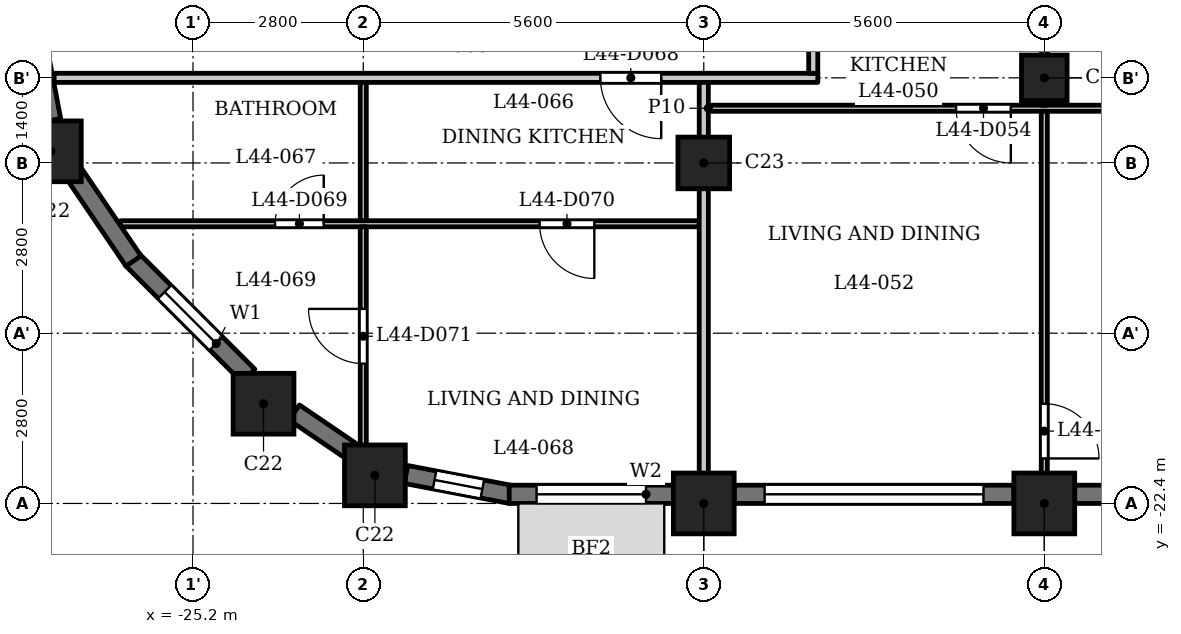
"""IFC4 building model, lengths in metres.
Left out: names, types, materials, properties, quantities, classifications, styles, units other than length and angle.
Written with IfcOpenShell. Run it as: python <this file> out.ifc"""

import sys

from ifc_helpers import new_model, si_unit, direction, frame, frame_2d, origin, origin_2d, place, context, subcontext, project, spatial, rectangle, extrude, element, fill, save


model = new_model("IFC4")
c1 = context("Model", 3, precision=1e-05, world=origin(), true_north=direction((0.0, 1.0)))
c2 = subcontext(c1, "Body", "Model", "MODEL_VIEW")
j1 = project(units=[si_unit("LENGTHUNIT", "METRE"), si_unit("PLANEANGLEUNIT", "RADIAN")], contexts=[c1])
p1 = place(None, origin())
s1 = spatial("IfcSite", under=j1, at=p1, CompositionType="ELEMENT")
p2 = place(p1, origin())
s2 = spatial("IfcBuilding", under=s1, at=p2, CompositionType="ELEMENT")
p3 = place(p2, frame((0.0, 0.0, 171.1)))
s3 = spatial("IfcBuildingStorey", under=s2, at=p3, CompositionType="ELEMENT", Elevation=171.1)
for number, where, z_axis, x_axis in (
    (1, (-22.209, -21.938, 0.0), (0.0, 0.0, 1.0), (1.0, 0.0, 0.0)),
    (2, (-16.8, -22.4, 0.0), (0.0, 0.0, 1.0), (1.0, 0.0, 0.0)),
    (3, (-11.2, -22.4, 0.0), (0.0, 0.0, 1.0), (1.0, 0.0, 0.0)),
    (4, (-27.538, -16.609, 0.0), (0.0, 0.0, 1.0), (1.0, 0.0, 0.0)),
    (5, (-24.04, -20.76, 0.0), (0.0, 0.0, 1.0), (1.0, 0.0, 0.0)),
):
    element("IfcColumn", number, at=place(p3, frame(where, z_axis=z_axis, x_axis=x_axis)), inside=s3, PredefinedType="COLUMN", context=c2, shape_type="SweptSolid", body=[
        extrude(rectangle(XDim=1.0, YDim=1.0, at=origin_2d()), origin(), (0.0, 0.0, 1.0), 3.5),
    ])
p4 = place(p3, frame((-16.8, -16.8, 0.0), z_axis=(0.0, 0.0, 1.0), x_axis=(1.0, 0.0, 0.0)))
e6 = element("IfcColumn", 6, at=p4, inside=s3, PredefinedType="COLUMN", context=c2, shape_type="SweptSolid", body=[
    extrude(rectangle(XDim=0.85, YDim=0.85, at=origin_2d()), origin(), (0.0, 0.0, 1.0), 3.5),
])
p5 = place(p3, frame((-11.2, -15.4, 0.0), z_axis=(0.0, 0.0, 1.0), x_axis=(1.0, 0.0, 0.0)))
e7 = element("IfcColumn", 7, at=p5, inside=s3, PredefinedType="COLUMN", context=c2, shape_type="SweptSolid", body=[
    extrude(rectangle(XDim=0.75, YDim=0.75, at=origin_2d()), origin(), (0.0, 0.0, 1.0), 3.5),
])
p6 = place(p3, frame((-26.197, -18.391, 0.0), z_axis=(0.0, 0.0, 1.0), x_axis=(0.707061571201, -0.707151988282, 0.0)))
e8 = element("IfcWall", 8, at=p6, inside=s3, PredefinedType="SOLIDWALL", context=c2, shape_type="SweptSolid", body=[
    extrude(rectangle(XDim=2.7, YDim=0.3, at=frame_2d((1.35, 0.0))), origin(), (0.0, 0.0, 1.0), 2.45),
])
p7 = place(p6, frame((0.75, 0.0, 0.6)))
e9 = element("IfcOpeningElement", 9, at=p7, cuts=e8, PredefinedType="OPENING", context=c2, shape_type="SweptSolid", body=[
    extrude(rectangle(XDim=1.2, YDim=1.55, at=frame_2d((0.6, 0.775))), frame((0.0, 0.16, 0.0), z_axis=(0.0, -1.0, 0.0), x_axis=(1.0, 0.0, 0.0)), (0.0, 0.0, 1.0), 0.32),
])
p8 = place(p3, frame((-23.534, -20.904, 0.0), z_axis=(0.0, 0.0, 1.0), x_axis=(0.827103906596, -0.56204904385, 0.0)))
e10 = element("IfcWall", 10, at=p8, inside=s3, PredefinedType="SOLIDWALL", context=c2, shape_type="SweptSolid", body=[
    extrude(rectangle(XDim=1.177, YDim=0.3, at=frame_2d((0.589, 0.0))), origin(), (0.0, 0.0, 1.0), 3.2),
])
p9 = place(p3, frame((-21.697, -21.924, 0.0), z_axis=(0.0, 0.0, 1.0), x_axis=(0.982284988433, -0.187393173565, 0.0)))
e11 = element("IfcWall", 11, at=p9, inside=s3, PredefinedType="SOLIDWALL", context=c2, shape_type="SweptSolid", body=[
    extrude(rectangle(XDim=1.756, YDim=0.3, at=frame_2d((0.878, 0.0))), origin(), (0.0, 0.0, 1.0), 2.45),
])
p10 = place(p9, frame((0.478, 0.0, 0.6)))
e12 = element("IfcOpeningElement", 12, at=p10, cuts=e11, PredefinedType="OPENING", context=c2, shape_type="SweptSolid", body=[
    extrude(rectangle(XDim=0.8, YDim=1.55, at=frame_2d((0.4, 0.775))), frame((0.0, 0.16, 0.0), z_axis=(0.0, -1.0, 0.0), x_axis=(1.0, 0.0, 0.0)), (0.0, 0.0, 1.0), 0.32),
])
p11 = place(p3, frame((-20.0, -22.25, 0.0), z_axis=(0.0, 0.0, 1.0), x_axis=(1.0, 0.0, 0.0)))
e13 = element("IfcWall", 13, at=p11, inside=s3, PredefinedType="SOLIDWALL", context=c2, shape_type="SweptSolid", body=[
    extrude(rectangle(XDim=2.7, YDim=0.3, at=frame_2d((1.35, 0.0))), origin(), (0.0, 0.0, 1.0), 2.45),
])
p12 = place(p11, frame((0.45, 0.0, 0.9)))
e14 = element("IfcOpeningElement", 14, at=p12, cuts=e13, PredefinedType="OPENING", context=c2, shape_type="SweptSolid", body=[
    extrude(rectangle(XDim=1.8, YDim=1.25, at=frame_2d((0.9, 0.625))), frame((0.0, 0.16, 0.0), z_axis=(0.0, -1.0, 0.0), x_axis=(1.0, 0.0, 0.0)), (0.0, 0.0, 1.0), 0.32),
])
p13 = place(p3, frame((-16.3, -22.25, 0.0), z_axis=(0.0, 0.0, 1.0), x_axis=(1.0, 0.0, 0.0)))
e15 = element("IfcWall", 15, at=p13, inside=s3, PredefinedType="SOLIDWALL", context=c2, shape_type="SweptSolid", body=[
    extrude(rectangle(XDim=4.6, YDim=0.3, at=frame_2d((2.3, 0.0))), origin(), (0.0, 0.0, 1.0), 2.45),
])
p14 = place(p13, frame((0.5, 0.0, 1.2)))
e16 = element("IfcOpeningElement", 16, at=p14, cuts=e15, PredefinedType="OPENING", context=c2, shape_type="SweptSolid", body=[
    extrude(rectangle(XDim=3.6, YDim=0.95, at=frame_2d((1.8, 0.475))), frame((0.0, 0.16, 0.0), z_axis=(0.0, -1.0, 0.0), x_axis=(1.0, 0.0, 0.0)), (0.0, 0.0, 1.0), 0.32),
])
p15 = place(p3, frame((-10.7, -22.25, 0.0), z_axis=(0.0, 0.0, 1.0), x_axis=(1.0, 0.0, 0.0)))
e17 = element("IfcWall", 17, at=p15, inside=s3, PredefinedType="SOLIDWALL", context=c2, shape_type="SweptSolid", body=[
    extrude(rectangle(XDim=4.6, YDim=0.3, at=frame_2d((2.3, 0.0))), origin(), (0.0, 0.0, 1.0), 2.45),
])
p16 = place(p15, frame((0.5, 0.0, 1.2)))
e18 = element("IfcOpeningElement", 18, at=p16, cuts=e17, PredefinedType="OPENING", context=c2, shape_type="SweptSolid", body=[
    extrude(rectangle(XDim=3.6, YDim=0.95, at=frame_2d((1.8, 0.475))), frame((0.0, 0.16, 0.0), z_axis=(0.0, -1.0, 0.0), x_axis=(1.0, 0.0, 0.0)), (0.0, 0.0, 1.0), 0.32),
])
for number, where, z_axis, x_axis in (
    (19, (-27.853, -14.372, 0.0), (0.0, 0.0, 1.0), (0.187, -0.982, 0.0)),
    (20, (-27.166, -16.96, 0.0), (0.0, 0.0, 1.0), (0.562, -0.827, 0.0)),
):
    element("IfcWall", number, at=place(p3, frame(where, z_axis=z_axis, x_axis=x_axis)), inside=s3, PredefinedType="SOLIDWALL", context=c2, shape_type="SweptSolid", body=[
        extrude(rectangle(XDim=1.756, YDim=0.3, at=frame_2d((0.878, 0.0))), origin(), (0.0, 0.0, 1.0), 2.45),
    ])
p17 = place(p3, frame((-26.394, -17.8, 0.0), z_axis=(0.0, 0.0, 1.0), x_axis=(1.0, 0.0, 0.0)))
e21 = element("IfcWall", 21, at=p17, inside=s3, PredefinedType="PARTITIONING", context=c2, shape_type="SweptSolid", body=[
    extrude(rectangle(XDim=9.519, YDim=0.1, at=frame_2d((4.76, 0.0))), origin(), (0.0, 0.0, 1.0), 3.2),
])
p18 = place(p17, frame((2.544, 0.0, 0.0)))
e22 = element("IfcOpeningElement", 22, at=p18, cuts=e21, PredefinedType="OPENING", context=c2, shape_type="SweptSolid", body=[
    extrude(rectangle(XDim=0.8, YDim=2.1, at=frame_2d((0.4, 1.05))), frame((0.0, 0.06, 0.0), z_axis=(0.0, -1.0, 0.0), x_axis=(1.0, 0.0, 0.0)), (0.0, 0.0, 1.0), 0.12),
])
p19 = place(p17, frame((6.894, 0.0, 0.0)))
e23 = element("IfcOpeningElement", 23, at=p19, cuts=e21, PredefinedType="OPENING", context=c2, shape_type="SweptSolid", body=[
    extrude(rectangle(XDim=0.9, YDim=2.1, at=frame_2d((0.45, 1.05))), frame((0.0, 0.06, 0.0), z_axis=(0.0, -1.0, 0.0), x_axis=(1.0, 0.0, 0.0)), (0.0, 0.0, 1.0), 0.12),
])
p20 = place(p3, frame((-16.725, -15.9, 0.0), z_axis=(0.0, 0.0, 1.0), x_axis=(1.0, 0.0, 0.0)))
e24 = element("IfcWall", 24, at=p20, inside=s3, PredefinedType="PARTITIONING", context=c2, shape_type="SweptSolid", body=[
    extrude(rectangle(XDim=33.45, YDim=0.1, at=frame_2d((16.725, 0.0))), origin(), (0.0, 0.0, 1.0), 3.2),
])
p21 = place(p20, frame((9.675, 0.0, 0.0)))
e25 = element("IfcOpeningElement", 25, at=p21, cuts=e24, PredefinedType="OPENING", context=c2, shape_type="SweptSolid", body=[
    extrude(rectangle(XDim=0.8, YDim=2.1, at=frame_2d((0.4, 1.05))), frame((0.0, 0.06, 0.0), z_axis=(0.0, -1.0, 0.0), x_axis=(1.0, 0.0, 0.0)), (0.0, 0.0, 1.0), 0.12),
])
p22 = place(p20, frame((4.075, 0.0, 0.0)))
e26 = element("IfcOpeningElement", 26, at=p22, cuts=e24, PredefinedType="OPENING", context=c2, shape_type="SweptSolid", body=[
    extrude(rectangle(XDim=0.9, YDim=2.1, at=frame_2d((0.45, 1.05))), frame((0.0, 0.06, 0.0), z_axis=(0.0, -1.0, 0.0), x_axis=(1.0, 0.0, 0.0)), (0.0, 0.0, 1.0), 0.12),
])
p23 = place(p20, frame((20.875, 0.0, 0.0)))
e27 = element("IfcOpeningElement", 27, at=p23, cuts=e24, PredefinedType="OPENING", context=c2, shape_type="SweptSolid", body=[
    extrude(rectangle(XDim=0.8, YDim=2.1, at=frame_2d((0.4, 1.05))), frame((0.0, 0.06, 0.0), z_axis=(0.0, -1.0, 0.0), x_axis=(1.0, 0.0, 0.0)), (0.0, 0.0, 1.0), 0.12),
])
p24 = place(p20, frame((15.275, 0.0, 0.0)))
e28 = element("IfcOpeningElement", 28, at=p24, cuts=e24, PredefinedType="OPENING", context=c2, shape_type="SweptSolid", body=[
    extrude(rectangle(XDim=0.9, YDim=2.1, at=frame_2d((0.45, 1.05))), frame((0.0, 0.06, 0.0), z_axis=(0.0, -1.0, 0.0), x_axis=(1.0, 0.0, 0.0)), (0.0, 0.0, 1.0), 0.12),
])
p25 = place(p20, frame((30.825, 0.0, 0.0)))
e29 = element("IfcOpeningElement", 29, at=p25, cuts=e24, PredefinedType="OPENING", context=c2, shape_type="SweptSolid", body=[
    extrude(rectangle(XDim=0.8, YDim=2.1, at=frame_2d((0.4, 1.05))), frame((0.0, 0.06, 0.0), z_axis=(0.0, -1.0, 0.0), x_axis=(1.0, 0.0, 0.0)), (0.0, 0.0, 1.0), 0.12),
])
p26 = place(p20, frame((26.475, 0.0, 0.0)))
e30 = element("IfcOpeningElement", 30, at=p26, cuts=e24, PredefinedType="OPENING", context=c2, shape_type="SweptSolid", body=[
    extrude(rectangle(XDim=0.9, YDim=2.1, at=frame_2d((0.45, 1.05))), frame((0.0, 0.06, 0.0), z_axis=(0.0, -1.0, 0.0), x_axis=(1.0, 0.0, 0.0)), (0.0, 0.0, 1.0), 0.12),
])
p27 = place(p3, frame((-27.484, -15.4, 0.0), z_axis=(0.0, 0.0, 1.0), x_axis=(1.0, 0.0, 0.0)))
e31 = element("IfcWall", 31, at=p27, inside=s3, PredefinedType="PARTITIONING", context=c2, shape_type="SweptSolid", body=[
    extrude(rectangle(XDim=12.559, YDim=0.15, at=frame_2d((6.279, 0.0))), origin(), (0.0, 0.0, 1.0), 3.2),
])
p28 = place(p27, frame((8.984, 0.0, 0.0)))
e32 = element("IfcOpeningElement", 32, at=p28, cuts=e31, PredefinedType="OPENING", context=c2, shape_type="SweptSolid", body=[
    extrude(rectangle(XDim=1.0, YDim=2.1, at=frame_2d((0.5, 1.05))), frame((0.0, 0.085, 0.0), z_axis=(0.0, -1.0, 0.0), x_axis=(1.0, 0.0, 0.0)), (0.0, 0.0, 1.0), 0.17),
])
p29 = place(p3, frame((-22.4, -21.72, 0.0), z_axis=(0.0, 0.0, 1.0), x_axis=(0.0, 1.0, 0.0)))
e33 = element("IfcWall", 33, at=p29, inside=s3, PredefinedType="PARTITIONING", context=c2, shape_type="SweptSolid", body=[
    extrude(rectangle(XDim=3.87, YDim=0.1, at=frame_2d((1.935, 0.0))), origin(), (0.0, 0.0, 1.0), 3.2),
])
p30 = place(p29, frame((1.62, 0.0, 0.0)))
e34 = element("IfcOpeningElement", 34, at=p30, cuts=e33, PredefinedType="OPENING", context=c2, shape_type="SweptSolid", body=[
    extrude(rectangle(XDim=0.9, YDim=2.1, at=frame_2d((0.45, 1.05))), frame((0.0, 0.06, 0.0), z_axis=(0.0, -1.0, 0.0), x_axis=(1.0, 0.0, 0.0)), (0.0, 0.0, 1.0), 0.12),
])
p31 = place(p3, frame((-22.4, -17.75, 0.0), z_axis=(0.0, 0.0, 1.0), x_axis=(0.0, 1.0, 0.0)))
e35 = element("IfcWall", 35, at=p31, inside=s3, PredefinedType="PARTITIONING", context=c2, shape_type="SweptSolid", body=[
    extrude(rectangle(XDim=2.275, YDim=0.1, at=frame_2d((1.137, 0.0))), origin(), (0.0, 0.0, 1.0), 3.2),
])
p32 = place(p3, frame((-16.8, -22.88, 0.0), z_axis=(0.0, 0.0, 1.0), x_axis=(0.0, 1.0, 0.0)))
e36 = element("IfcWall", 36, at=p32, inside=s3, PredefinedType="PARTITIONING", context=c2, shape_type="SweptSolid", body=[
    extrude(rectangle(XDim=7.405, YDim=0.15, at=frame_2d((3.702, 0.0))), origin(), (0.0, 0.0, 1.0), 3.2),
])
p33 = place(p3, frame((-15.0, -15.325, 0.0), z_axis=(0.0, 0.0, 1.0), x_axis=(0.0, 1.0, 0.0)))
e37 = element("IfcWall", 37, at=p33, inside=s3, PredefinedType="PARTITIONING", context=c2, shape_type="SweptSolid", body=[
    extrude(rectangle(XDim=2.05, YDim=0.15, at=frame_2d((1.025, 0.0))), origin(), (0.0, 0.0, 1.0), 3.2),
])
p34 = place(p33, frame((0.574, 0.0, 0.0)))
e38 = element("IfcOpeningElement", 38, at=p34, cuts=e37, PredefinedType="OPENING", context=c2, shape_type="SweptSolid", body=[
    extrude(rectangle(XDim=1.0, YDim=2.1, at=frame_2d((0.5, 1.05))), frame((0.0, 0.085, 0.0), z_axis=(0.0, -1.0, 0.0), x_axis=(1.0, 0.0, 0.0)), (0.0, 0.0, 1.0), 0.17),
])
p35 = place(p3, frame((-11.2, -22.88, 0.0), z_axis=(0.0, 0.0, 1.0), x_axis=(0.0, 1.0, 0.0)))
e39 = element("IfcWall", 39, at=p35, inside=s3, PredefinedType="PARTITIONING", context=c2, shape_type="SweptSolid", body=[
    extrude(rectangle(XDim=6.93, YDim=0.1, at=frame_2d((3.465, 0.0))), origin(), (0.0, 0.0, 1.0), 3.2),
])
p36 = place(p35, frame((1.22, 0.0, 0.0)))
e40 = element("IfcOpeningElement", 40, at=p36, cuts=e39, PredefinedType="OPENING", context=c2, shape_type="SweptSolid", body=[
    extrude(rectangle(XDim=0.9, YDim=2.1, at=frame_2d((0.45, 1.05))), frame((0.0, 0.06, 0.0), z_axis=(0.0, -1.0, 0.0), x_axis=(1.0, 0.0, 0.0)), (0.0, 0.0, 1.0), 0.12),
])
p37 = place(p3, frame((-11.2, -15.85, 0.0), z_axis=(0.0, 0.0, 1.0), x_axis=(0.0, 1.0, 0.0)))
e41 = element("IfcWall", 41, at=p37, inside=s3, PredefinedType="PARTITIONING", context=c2, shape_type="SweptSolid", body=[
    extrude(rectangle(XDim=2.575, YDim=0.1, at=frame_2d((1.288, 0.0))), origin(), (0.0, 0.0, 1.0), 3.2),
])
p38 = place(p22, origin())
e42 = element("IfcDoor", 42, at=p38, inside=s3, OperationType="SINGLE_SWING_RIGHT", PredefinedType="DOOR", context=c2, shape_type="SweptSolid", body=[
    extrude(rectangle(XDim=0.9, YDim=2.1, at=frame_2d((0.45, 1.05))), frame((0.0, 0.025, 0.0), z_axis=(0.0, -1.0, 0.0), x_axis=(1.0, 0.0, 0.0)), (0.0, 0.0, 1.0), 0.05),
])
fill(e26, e42)
p39 = place(p36, origin())
e43 = element("IfcDoor", 43, at=p39, inside=s3, OperationType="SINGLE_SWING_LEFT", PredefinedType="DOOR", context=c2, shape_type="SweptSolid", body=[
    extrude(rectangle(XDim=0.9, YDim=2.1, at=frame_2d((0.45, 1.05))), frame((0.0, 0.025, 0.0), z_axis=(0.0, -1.0, 0.0), x_axis=(1.0, 0.0, 0.0)), (0.0, 0.0, 1.0), 0.05),
])
fill(e40, e43)
p40 = place(p28, origin())
e44 = element("IfcDoor", 44, at=p40, inside=s3, OperationType="SINGLE_SWING_RIGHT", PredefinedType="DOOR", context=c2, shape_type="SweptSolid", body=[
    extrude(rectangle(XDim=1.0, YDim=2.1, at=frame_2d((0.5, 1.05))), frame((0.0, 0.025, 0.0), z_axis=(0.0, -1.0, 0.0), x_axis=(1.0, 0.0, 0.0)), (0.0, 0.0, 1.0), 0.05),
])
fill(e32, e44)
p41 = place(p18, origin())
e45 = element("IfcDoor", 45, at=p41, inside=s3, OperationType="SINGLE_SWING_LEFT", PredefinedType="DOOR", context=c2, shape_type="SweptSolid", body=[
    extrude(rectangle(XDim=0.8, YDim=2.1, at=frame_2d((0.4, 1.05))), frame((0.0, 0.025, 0.0), z_axis=(0.0, -1.0, 0.0), x_axis=(1.0, 0.0, 0.0)), (0.0, 0.0, 1.0), 0.05),
])
fill(e22, e45)
p42 = place(p19, origin())
e46 = element("IfcDoor", 46, at=p42, inside=s3, OperationType="SINGLE_SWING_RIGHT", PredefinedType="DOOR", context=c2, shape_type="SweptSolid", body=[
    extrude(rectangle(XDim=0.9, YDim=2.1, at=frame_2d((0.45, 1.05))), frame((0.0, 0.025, 0.0), z_axis=(0.0, -1.0, 0.0), x_axis=(1.0, 0.0, 0.0)), (0.0, 0.0, 1.0), 0.05),
])
fill(e23, e46)
p43 = place(p30, origin())
e47 = element("IfcDoor", 47, at=p43, inside=s3, OperationType="SINGLE_SWING_LEFT", PredefinedType="DOOR", context=c2, shape_type="SweptSolid", body=[
    extrude(rectangle(XDim=0.9, YDim=2.1, at=frame_2d((0.45, 1.05))), frame((0.0, 0.025, 0.0), z_axis=(0.0, -1.0, 0.0), x_axis=(1.0, 0.0, 0.0)), (0.0, 0.0, 1.0), 0.05),
])
fill(e34, e47)
p44 = place(p7, origin())
e48 = element("IfcWindow", 48, at=p44, inside=s3, PartitioningType="SINGLE_PANEL", PredefinedType="WINDOW", context=c2, shape_type="SweptSolid", body=[
    extrude(rectangle(XDim=1.2, YDim=1.55, at=frame_2d((0.6, 0.775))), frame((0.0, 0.03, 0.0), z_axis=(0.0, -1.0, 0.0), x_axis=(1.0, 0.0, 0.0)), (0.0, 0.0, 1.0), 0.06),
])
fill(e9, e48)
p45 = place(p10, origin())
e49 = element("IfcWindow", 49, at=p45, inside=s3, PartitioningType="SINGLE_PANEL", PredefinedType="WINDOW", context=c2, shape_type="SweptSolid", body=[
    extrude(rectangle(XDim=0.8, YDim=1.55, at=frame_2d((0.4, 0.775))), frame((0.0, 0.03, 0.0), z_axis=(0.0, -1.0, 0.0), x_axis=(1.0, 0.0, 0.0)), (0.0, 0.0, 1.0), 0.06),
])
fill(e12, e49)
p46 = place(p12, origin())
e50 = element("IfcWindow", 50, at=p46, inside=s3, PartitioningType="SINGLE_PANEL", PredefinedType="WINDOW", context=c2, shape_type="SweptSolid", body=[
    extrude(rectangle(XDim=1.8, YDim=1.25, at=frame_2d((0.9, 0.625))), frame((0.0, 0.03, 0.0), z_axis=(0.0, -1.0, 0.0), x_axis=(1.0, 0.0, 0.0)), (0.0, 0.0, 1.0), 0.06),
])
fill(e14, e50)
p47 = place(p14, origin())
e51 = element("IfcWindow", 51, at=p47, inside=s3, PartitioningType="SINGLE_PANEL", PredefinedType="WINDOW", context=c2, shape_type="SweptSolid", body=[
    extrude(rectangle(XDim=3.6, YDim=0.95, at=frame_2d((1.8, 0.475))), frame((0.0, 0.03, 0.0), z_axis=(0.0, -1.0, 0.0), x_axis=(1.0, 0.0, 0.0)), (0.0, 0.0, 1.0), 0.06),
])
fill(e16, e51)
save(model, sys.argv[1])
